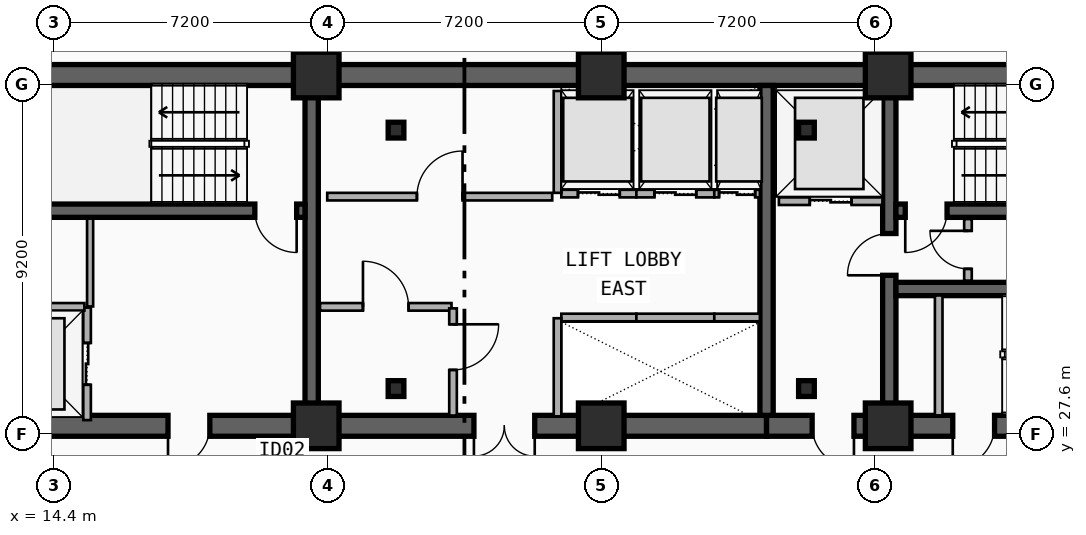
"""IFC4 building model, lengths in metres.
Left out: names, types, materials, properties, quantities, classifications, styles, units other than length and angle.
Written with IfcOpenShell. Run it as: python <this file> out.ifc"""

import sys

from ifc_helpers import new_model, si_unit, direction, frame, frame_2d, origin, origin_2d, place, context, subcontext, project, spatial, rectangle, i_section, extrude, element, fill, save


model = new_model("IFC4")
c1 = context("Model", 3, precision=1e-05, world=origin(), true_north=direction((0.0, 1.0)))
c2 = subcontext(c1, "Body", "Model", "MODEL_VIEW")
j1 = project(units=[si_unit("LENGTHUNIT", "METRE"), si_unit("PLANEANGLEUNIT", "RADIAN")], contexts=[c1])
p1 = place(None, origin())
s1 = spatial("IfcSite", under=j1, at=p1, CompositionType="ELEMENT")
p2 = place(p1, origin())
s2 = spatial("IfcBuilding", under=s1, at=p2, CompositionType="ELEMENT")
p3 = place(p2, frame((0.0, 0.0, 176.75)))
s3 = spatial("IfcBuildingStorey", under=s2, at=p3, CompositionType="ELEMENT", Elevation=176.75)
p4 = place(p3, frame((12.15, 37.05, 0.0), z_axis=(0.0, 0.0, 1.0), x_axis=(1.0, 0.0, 0.0)))
e1 = element("IfcWall", 1, at=p4, inside=s3, PredefinedType="SHEAR", context=c2, shape_type="SweptSolid", body=[
    extrude(rectangle(XDim=33.23, YDim=0.55, at=frame_2d((16.615, 0.0))), origin(), (0.0, 0.0, 1.0), 3.55),
])
p5 = place(p3, frame((21.18, 27.82, 0.0), z_axis=(0.0, 0.0, 1.0), x_axis=(-1.0, 0.0, 0.0)))
e2 = element("IfcWall", 2, at=p5, inside=s3, PredefinedType="SHEAR", context=c2, shape_type="SweptSolid", body=[
    extrude(rectangle(XDim=9.03, YDim=0.55, at=frame_2d((4.515, 0.0))), origin(), (0.0, 0.0, 1.0), 3.55),
])
p6 = place(p5, frame((2.68, 0.0, 0.0)))
e3 = element("IfcOpeningElement", 3, at=p6, cuts=e2, PredefinedType="OPENING", context=c2, shape_type="SweptSolid", body=[
    extrude(rectangle(XDim=1.1, YDim=2.15, at=frame_2d((0.55, 1.075))), frame((0.0, 0.285, 0.0), z_axis=(0.0, -1.0, 0.0), x_axis=(1.0, 0.0, 0.0)), (0.0, 0.0, 1.0), 0.57),
])
p7 = place(p3, frame((33.15, 27.82, 0.0), z_axis=(0.0, 0.0, 1.0), x_axis=(-1.0, 0.0, 0.0)))
e4 = element("IfcWall", 4, at=p7, inside=s3, PredefinedType="SHEAR", context=c2, shape_type="SweptSolid", body=[
    extrude(rectangle(XDim=11.97, YDim=0.55, at=frame_2d((5.985, 0.0))), origin(), (0.0, 0.0, 1.0), 3.55),
])
p8 = place(p7, frame((6.1, 0.0, 0.0)))
e5 = element("IfcOpeningElement", 5, at=p8, cuts=e4, PredefinedType="OPENING", context=c2, shape_type="SweptSolid", body=[
    extrude(rectangle(XDim=1.6, YDim=2.2, at=frame_2d((0.8, 1.1))), frame((0.0, 0.285, 0.0), z_axis=(0.0, -1.0, 0.0), x_axis=(1.0, 0.0, 0.0)), (0.0, 0.0, 1.0), 0.57),
])
p9 = place(p3, frame((45.38, 27.82, 0.0), z_axis=(0.0, 0.0, 1.0), x_axis=(-1.0, 0.0, 0.0)))
e6 = element("IfcWall", 6, at=p9, inside=s3, PredefinedType="SHEAR", context=c2, shape_type="SweptSolid", body=[
    extrude(rectangle(XDim=12.23, YDim=0.55, at=frame_2d((6.115, 0.0))), origin(), (0.0, 0.0, 1.0), 3.55),
])
p10 = place(p9, frame((9.93, 0.0, 0.0)))
e7 = element("IfcOpeningElement", 7, at=p10, cuts=e6, PredefinedType="OPENING", context=c2, shape_type="SweptSolid", body=[
    extrude(rectangle(XDim=1.1, YDim=2.15, at=frame_2d((0.55, 1.075))), frame((0.0, 0.285, 0.0), z_axis=(0.0, -1.0, 0.0), x_axis=(1.0, 0.0, 0.0)), (0.0, 0.0, 1.0), 0.57),
])
p11 = place(p9, frame((6.23, 0.0, 0.0)))
e8 = element("IfcOpeningElement", 8, at=p11, cuts=e6, PredefinedType="OPENING", context=c2, shape_type="SweptSolid", body=[
    extrude(rectangle(XDim=1.1, YDim=2.15, at=frame_2d((0.55, 1.075))), frame((0.0, 0.285, 0.0), z_axis=(0.0, -1.0, 0.0), x_axis=(1.0, 0.0, 0.0)), (0.0, 0.0, 1.0), 0.57),
])
for number, where, z_axis, x_axis in (
    (9, (21.18, 28.095, 0.0), (0.0, 0.0, 1.0), (0.0, 1.0, 0.0)),
    (10, (33.15, 28.095, 0.0), (0.0, 0.0, 1.0), (0.0, 1.0, 0.0)),
):
    element("IfcWall", number, at=place(p3, frame(where, z_axis=z_axis, x_axis=x_axis)), inside=s3, PredefinedType="SHEAR", context=c2, shape_type="SweptSolid", body=[
        extrude(rectangle(XDim=8.68, YDim=0.35, at=frame_2d((4.34, 0.0))), origin(), (0.0, 0.0, 1.0), 3.55),
    ])
p12 = place(p3, frame((36.38, 28.095, 0.0), z_axis=(0.0, 0.0, 1.0), x_axis=(0.0, 1.0, 0.0)))
e11 = element("IfcWall", 11, at=p12, inside=s3, PredefinedType="SHEAR", context=c2, shape_type="SweptSolid", body=[
    extrude(rectangle(XDim=8.68, YDim=0.35, at=frame_2d((4.34, 0.0))), origin(), (0.0, 0.0, 1.0), 3.55),
])
p13 = place(p12, frame((3.685, 0.0, 0.0)))
e12 = element("IfcOpeningElement", 12, at=p13, cuts=e11, PredefinedType="OPENING", context=c2, shape_type="SweptSolid", body=[
    extrude(rectangle(XDim=1.1, YDim=2.15, at=frame_2d((0.55, 1.075))), frame((0.0, 0.185, 0.0), z_axis=(0.0, -1.0, 0.0), x_axis=(1.0, 0.0, 0.0)), (0.0, 0.0, 1.0), 0.37),
])
p14 = place(p3, frame((21.005, 33.48, 0.0), z_axis=(0.0, 0.0, 1.0), x_axis=(-1.0, 0.0, 0.0)))
e13 = element("IfcWall", 13, at=p14, inside=s3, PredefinedType="SHEAR", context=c2, shape_type="SweptSolid", body=[
    extrude(rectangle(XDim=8.58, YDim=0.35, at=frame_2d((4.29, 0.0))), origin(), (0.0, 0.0, 1.0), 3.55),
])
p15 = place(p14, frame((0.22, 0.0, 0.0)))
e14 = element("IfcOpeningElement", 14, at=p15, cuts=e13, PredefinedType="OPENING", context=c2, shape_type="SweptSolid", body=[
    extrude(rectangle(XDim=1.1, YDim=2.15, at=frame_2d((0.55, 1.075))), frame((0.0, 0.185, 0.0), z_axis=(0.0, -1.0, 0.0), x_axis=(1.0, 0.0, 0.0)), (0.0, 0.0, 1.0), 0.37),
])
p16 = place(p3, frame((45.105, 33.48, 0.0), z_axis=(0.0, 0.0, 1.0), x_axis=(-1.0, 0.0, 0.0)))
e15 = element("IfcWall", 15, at=p16, inside=s3, PredefinedType="SHEAR", context=c2, shape_type="SweptSolid", body=[
    extrude(rectangle(XDim=8.55, YDim=0.35, at=frame_2d((4.275, 0.0))), origin(), (0.0, 0.0, 1.0), 3.55),
])
p17 = place(p16, frame((7.205, 0.0, 0.0)))
e16 = element("IfcOpeningElement", 16, at=p17, cuts=e15, PredefinedType="OPENING", context=c2, shape_type="SweptSolid", body=[
    extrude(rectangle(XDim=1.1, YDim=2.15, at=frame_2d((0.55, 1.075))), frame((0.0, 0.185, 0.0), z_axis=(0.0, -1.0, 0.0), x_axis=(1.0, 0.0, 0.0)), (0.0, 0.0, 1.0), 0.37),
])
p18 = place(p3, frame((36.555, 31.42, 0.0), z_axis=(0.0, 0.0, 1.0), x_axis=(1.0, 0.0, 0.0)))
e17 = element("IfcWall", 17, at=p18, inside=s3, PredefinedType="SHEAR", context=c2, shape_type="SweptSolid", body=[
    extrude(rectangle(XDim=8.55, YDim=0.35, at=frame_2d((4.275, 0.0))), origin(), (0.0, 0.0, 1.0), 3.55),
])
for number, where, z_axis, x_axis in (
    (18, (23.4, 28.8, 0.0), (0.0, 0.0, 1.0), (1.0, 0.0, 0.0)),
    (19, (34.2, 28.8, 0.0), (0.0, 0.0, 1.0), (1.0, 0.0, 0.0)),
    (20, (34.2, 35.6, 0.0), (0.0, 0.0, 1.0), (1.0, 0.0, 0.0)),
    (21, (23.4, 35.6, 0.0), (0.0, 0.0, 1.0), (1.0, 0.0, 0.0)),
):
    element("IfcColumn", number, at=place(p3, frame(where, z_axis=z_axis, x_axis=x_axis)), inside=s3, PredefinedType="COLUMN", context=c2, shape_type="SweptSolid", body=[
        extrude(i_section(OverallWidth=0.413, OverallDepth=0.415, WebThickness=0.03, FlangeThickness=0.047, FilletRadius=0.015, at=origin_2d()), origin(), (0.0, 0.0, 1.0), 3.55),
    ])
for number, where, z_axis, x_axis in (
    (22, (21.3, 27.82, 0.0), (0.0, 0.0, 1.0), (1.0, 0.0, 0.0)),
    (23, (21.3, 37.05, 0.0), (0.0, 0.0, 1.0), (1.0, 0.0, 0.0)),
    (24, (28.8, 27.82, 0.0), (0.0, 0.0, 1.0), (1.0, 0.0, 0.0)),
    (25, (28.8, 37.05, 0.0), (0.0, 0.0, 1.0), (1.0, 0.0, 0.0)),
    (26, (36.35, 27.82, 0.0), (0.0, 0.0, 1.0), (1.0, 0.0, 0.0)),
    (27, (36.35, 37.05, 0.0), (0.0, 0.0, 1.0), (1.0, 0.0, 0.0)),
):
    element("IfcColumn", number, at=place(p3, frame(where, z_axis=z_axis, x_axis=x_axis)), inside=s3, PredefinedType="COLUMN", context=c2, shape_type="SweptSolid", body=[
        extrude(rectangle(XDim=1.2, YDim=1.2, at=origin_2d()), origin(), (0.0, 0.0, 1.0), 3.55),
    ])
p19 = place(p3, frame((15.27, 27.97, 0.0), z_axis=(0.0, 0.0, 1.0), x_axis=(0.0, 1.0, 0.0)))
e28 = element("IfcWall", 28, at=p19, inside=s3, PredefinedType="PARTITIONING", context=c2, shape_type="SweptSolid", body=[
    extrude(rectangle(XDim=2.96, YDim=0.2, at=frame_2d((1.48, 0.0))), origin(), (0.0, 0.0, 1.0), 2.36),
])
p20 = place(p19, frame((0.93, 0.0, 0.0)))
e29 = element("IfcOpeningElement", 29, at=p20, cuts=e28, PredefinedType="OPENING", context=c2, shape_type="SweptSolid", body=[
    extrude(rectangle(XDim=1.1, YDim=2.15, at=frame_2d((0.55, 1.075))), frame((0.0, 0.11, 0.0), z_axis=(0.0, -1.0, 0.0), x_axis=(1.0, 0.0, 0.0)), (0.0, 0.0, 1.0), 0.22),
])
p21 = place(p3, frame((12.45, 30.95, 0.0), z_axis=(0.0, 0.0, 1.0), x_axis=(1.0, 0.0, 0.0)))
e30 = element("IfcWall", 30, at=p21, inside=s3, PredefinedType="PARTITIONING", context=c2, shape_type="SweptSolid", body=[
    extrude(rectangle(XDim=2.75, YDim=0.2, at=frame_2d((1.375, 0.0))), origin(), (0.0, 0.0, 1.0), 2.36),
])
p22 = place(p3, frame((33.475, 33.73, 0.0), z_axis=(0.0, 0.0, 1.0), x_axis=(1.0, 0.0, 0.0)))
e31 = element("IfcWall", 31, at=p22, inside=s3, PredefinedType="PARTITIONING", context=c2, shape_type="SweptSolid", body=[
    extrude(rectangle(XDim=2.725, YDim=0.2, at=frame_2d((1.362, 0.0))), origin(), (0.0, 0.0, 1.0), 2.36),
])
p23 = place(p22, frame((0.812, 0.0, 0.0)))
e32 = element("IfcOpeningElement", 32, at=p23, cuts=e31, PredefinedType="OPENING", context=c2, shape_type="SweptSolid", body=[
    extrude(rectangle(XDim=1.1, YDim=2.15, at=frame_2d((0.55, 1.075))), frame((0.0, 0.11, 0.0), z_axis=(0.0, -1.0, 0.0), x_axis=(1.0, 0.0, 0.0)), (0.0, 0.0, 1.0), 0.22),
])
p24 = place(p3, frame((27.75, 30.67, 0.0), z_axis=(0.0, 0.0, 1.0), x_axis=(1.0, 0.0, 0.0)))
e33 = element("IfcWall", 33, at=p24, inside=s3, PredefinedType="PARTITIONING", context=c2, shape_type="SweptSolid", body=[
    extrude(rectangle(XDim=1.975, YDim=0.2, at=frame_2d((0.988, 0.0))), origin(), (0.0, 0.0, 1.0), 2.36),
])
p25 = place(p3, frame((27.65, 28.07, 0.0), z_axis=(0.0, 0.0, 1.0), x_axis=(0.0, 1.0, 0.0)))
e34 = element("IfcWall", 34, at=p25, inside=s3, PredefinedType="PARTITIONING", context=c2, shape_type="SweptSolid", body=[
    extrude(rectangle(XDim=2.58, YDim=0.2, at=frame_2d((1.29, 0.0))), origin(), (0.0, 0.0, 1.0), 2.36),
])
p26 = place(p3, frame((29.725, 30.67, 0.0), z_axis=(0.0, 0.0, 1.0), x_axis=(1.0, 0.0, 0.0)))
e35 = element("IfcWall", 35, at=p26, inside=s3, PredefinedType="PARTITIONING", context=c2, shape_type="SweptSolid", body=[
    extrude(rectangle(XDim=2.05, YDim=0.2, at=frame_2d((1.025, 0.0))), origin(), (0.0, 0.0, 1.0), 2.67),
])
p27 = place(p3, frame((31.775, 30.67, 0.0), z_axis=(0.0, 0.0, 1.0), x_axis=(1.0, 0.0, 0.0)))
e36 = element("IfcWall", 36, at=p27, inside=s3, PredefinedType="PARTITIONING", context=c2, shape_type="SweptSolid", body=[
    extrude(rectangle(XDim=1.2, YDim=0.2, at=frame_2d((0.6, 0.0))), origin(), (0.0, 0.0, 1.0), 2.67),
])
p28 = place(p3, frame((27.75, 33.93, 0.0), z_axis=(0.0, 0.0, 1.0), x_axis=(1.0, 0.0, 0.0)))
e37 = element("IfcWall", 37, at=p28, inside=s3, PredefinedType="PARTITIONING", context=c2, shape_type="SweptSolid", body=[
    extrude(rectangle(XDim=1.975, YDim=0.2, at=frame_2d((0.988, 0.0))), origin(), (0.0, 0.0, 1.0), 2.36),
])
p29 = place(p28, frame((0.438, 0.0, 0.0)))
e38 = element("IfcOpeningElement", 38, at=p29, cuts=e37, PredefinedType="OPENING", context=c2, shape_type="SweptSolid", body=[
    extrude(rectangle(XDim=1.1, YDim=2.15, at=frame_2d((0.55, 1.075))), frame((0.0, 0.11, 0.0), z_axis=(0.0, -1.0, 0.0), x_axis=(1.0, 0.0, 0.0)), (0.0, 0.0, 1.0), 0.22),
])
p30 = place(p3, frame((27.65, 33.95, 0.0), z_axis=(0.0, 0.0, 1.0), x_axis=(0.0, 1.0, 0.0)))
e39 = element("IfcWall", 39, at=p30, inside=s3, PredefinedType="PARTITIONING", context=c2, shape_type="SweptSolid", body=[
    extrude(rectangle(XDim=2.68, YDim=0.2, at=frame_2d((1.34, 0.0))), origin(), (0.0, 0.0, 1.0), 2.36),
])
p31 = place(p3, frame((29.725, 33.93, 0.0), z_axis=(0.0, 0.0, 1.0), x_axis=(1.0, 0.0, 0.0)))
e40 = element("IfcWall", 40, at=p31, inside=s3, PredefinedType="PARTITIONING", context=c2, shape_type="SweptSolid", body=[
    extrude(rectangle(XDim=2.05, YDim=0.2, at=frame_2d((1.025, 0.0))), origin(), (0.0, 0.0, 1.0), 3.29),
])
p32 = place(p31, frame((0.475, 0.0, 0.0)))
e41 = element("IfcOpeningElement", 41, at=p32, cuts=e40, PredefinedType="OPENING", context=c2, shape_type="SweptSolid", body=[
    extrude(rectangle(XDim=1.1, YDim=2.15, at=frame_2d((0.55, 1.075))), frame((0.0, 0.11, 0.0), z_axis=(0.0, -1.0, 0.0), x_axis=(1.0, 0.0, 0.0)), (0.0, 0.0, 1.0), 0.22),
])
p33 = place(p3, frame((31.775, 33.93, 0.0), z_axis=(0.0, 0.0, 1.0), x_axis=(1.0, 0.0, 0.0)))
e42 = element("IfcWall", 42, at=p33, inside=s3, PredefinedType="PARTITIONING", context=c2, shape_type="SweptSolid", body=[
    extrude(rectangle(XDim=1.2, YDim=0.2, at=frame_2d((0.6, 0.0))), origin(), (0.0, 0.0, 1.0), 3.29),
])
p34 = place(p33, frame((0.125, 0.0, 0.0)))
e43 = element("IfcOpeningElement", 43, at=p34, cuts=e42, PredefinedType="OPENING", context=c2, shape_type="SweptSolid", body=[
    extrude(rectangle(XDim=0.95, YDim=2.15, at=frame_2d((0.475, 1.075))), frame((0.0, 0.11, 0.0), z_axis=(0.0, -1.0, 0.0), x_axis=(1.0, 0.0, 0.0)), (0.0, 0.0, 1.0), 0.22),
])
p35 = place(p3, frame((37.68, 28.095, 0.0), z_axis=(0.0, 0.0, 1.0), x_axis=(0.0, 1.0, 0.0)))
e44 = element("IfcWall", 44, at=p35, inside=s3, PredefinedType="PARTITIONING", context=c2, shape_type="SweptSolid", body=[
    extrude(rectangle(XDim=3.155, YDim=0.2, at=frame_2d((1.578, 0.0))), origin(), (0.0, 0.0, 1.0), 2.67),
])
p36 = place(p3, frame((38.45, 31.64, 0.0), z_axis=(0.0, 0.0, 1.0), x_axis=(0.0, 1.0, 0.0)))
e45 = element("IfcWall", 45, at=p36, inside=s3, PredefinedType="PARTITIONING", context=c2, shape_type="SweptSolid", body=[
    extrude(rectangle(XDim=1.62, YDim=0.2, at=frame_2d((0.81, 0.0))), origin(), (0.0, 0.0, 1.0), 3.29),
])
p37 = place(p36, frame((0.31, 0.0, 0.0)))
e46 = element("IfcOpeningElement", 46, at=p37, cuts=e45, PredefinedType="OPENING", context=c2, shape_type="SweptSolid", body=[
    extrude(rectangle(XDim=1.0, YDim=2.15, at=frame_2d((0.5, 1.075))), frame((0.0, 0.11, 0.0), z_axis=(0.0, -1.0, 0.0), x_axis=(1.0, 0.0, 0.0)), (0.0, 0.0, 1.0), 0.22),
])
p38 = place(p3, frame((21.4, 30.95, 0.0), z_axis=(0.0, 0.0, 1.0), x_axis=(1.0, 0.0, 0.0)))
e47 = element("IfcWall", 47, at=p38, inside=s3, PredefinedType="PARTITIONING", context=c2, shape_type="SweptSolid", body=[
    extrude(rectangle(XDim=3.46, YDim=0.2, at=frame_2d((1.73, 0.0))), origin(), (0.0, 0.0, 1.0), 2.36),
])
p39 = place(p38, frame((1.13, 0.0, 0.0)))
e48 = element("IfcOpeningElement", 48, at=p39, cuts=e47, PredefinedType="OPENING", context=c2, shape_type="SweptSolid", body=[
    extrude(rectangle(XDim=1.2, YDim=2.15, at=frame_2d((0.6, 1.075))), frame((0.0, 0.11, 0.0), z_axis=(0.0, -1.0, 0.0), x_axis=(1.0, 0.0, 0.0)), (0.0, 0.0, 1.0), 0.22),
])
p40 = place(p3, frame((21.59, 33.85, 0.0), z_axis=(0.0, 0.0, 1.0), x_axis=(1.0, 0.0, 0.0)))
e49 = element("IfcWall", 49, at=p40, inside=s3, PredefinedType="PARTITIONING", context=c2, shape_type="SweptSolid", body=[
    extrude(rectangle(XDim=5.92, YDim=0.2, at=frame_2d((2.96, 0.0))), origin(), (0.0, 0.0, 1.0), 2.36),
])
p41 = place(p40, frame((2.36, 0.0, 0.0)))
e50 = element("IfcOpeningElement", 50, at=p41, cuts=e49, PredefinedType="OPENING", context=c2, shape_type="SweptSolid", body=[
    extrude(rectangle(XDim=1.2, YDim=2.15, at=frame_2d((0.6, 1.075))), frame((0.0, 0.11, 0.0), z_axis=(0.0, -1.0, 0.0), x_axis=(1.0, 0.0, 0.0)), (0.0, 0.0, 1.0), 0.22),
])
p42 = place(p3, frame((24.9, 30.91, 0.0), z_axis=(0.0, 0.0, 1.0), x_axis=(0.0, -1.0, 0.0)))
e51 = element("IfcWall", 51, at=p42, inside=s3, PredefinedType="PARTITIONING", context=c2, shape_type="SweptSolid", body=[
    extrude(rectangle(XDim=2.82, YDim=0.2, at=frame_2d((1.41, 0.0))), origin(), (0.0, 0.0, 1.0), 2.67),
])
p43 = place(p42, frame((0.419, 0.0, 0.0)))
e52 = element("IfcOpeningElement", 52, at=p43, cuts=e51, PredefinedType="OPENING", context=c2, shape_type="SweptSolid", body=[
    extrude(rectangle(XDim=1.2, YDim=2.15, at=frame_2d((0.6, 1.075))), frame((0.0, 0.11, 0.0), z_axis=(0.0, -1.0, 0.0), x_axis=(1.0, 0.0, 0.0)), (0.0, 0.0, 1.0), 0.22),
])
p44 = place(p3, frame((15.35, 30.96, 0.0), z_axis=(0.0, 0.0, 1.0), x_axis=(0.0, 1.0, 0.0)))
e53 = element("IfcWall", 53, at=p44, inside=s3, PredefinedType="PARTITIONING", context=c2, shape_type="SweptSolid", body=[
    extrude(rectangle(XDim=2.31, YDim=0.16, at=frame_2d((1.155, 0.0))), origin(), (0.0, 0.0, 1.0), 3.29),
])
p45 = place(p20, origin())
e54 = element("IfcDoor", 54, at=p45, inside=s3, OperationType="DOUBLE_DOOR_SLIDING", PredefinedType="DOOR", context=c2, shape_type="SweptSolid", body=[
    extrude(rectangle(XDim=1.1, YDim=2.15, at=frame_2d((0.55, 1.075))), frame((0.0, 0.025, 0.0), z_axis=(0.0, -1.0, 0.0), x_axis=(1.0, 0.0, 0.0)), (0.0, 0.0, 1.0), 0.05),
])
fill(e29, e54)
p46 = place(p23, origin())
e55 = element("IfcDoor", 55, at=p46, inside=s3, OperationType="DOUBLE_DOOR_SLIDING", PredefinedType="DOOR", context=c2, shape_type="SweptSolid", body=[
    extrude(rectangle(XDim=1.1, YDim=2.15, at=frame_2d((0.55, 1.075))), frame((0.0, 0.025, 0.0), z_axis=(0.0, -1.0, 0.0), x_axis=(1.0, 0.0, 0.0)), (0.0, 0.0, 1.0), 0.05),
])
fill(e32, e55)
p47 = place(p29, origin())
e56 = element("IfcDoor", 56, at=p47, inside=s3, OperationType="DOUBLE_DOOR_SLIDING", PredefinedType="DOOR", context=c2, shape_type="SweptSolid", body=[
    extrude(rectangle(XDim=1.1, YDim=2.15, at=frame_2d((0.55, 1.075))), frame((0.0, 0.025, 0.0), z_axis=(0.0, -1.0, 0.0), x_axis=(1.0, 0.0, 0.0)), (0.0, 0.0, 1.0), 0.05),
])
fill(e38, e56)
p48 = place(p32, origin())
e57 = element("IfcDoor", 57, at=p48, inside=s3, OperationType="DOUBLE_DOOR_SLIDING", PredefinedType="DOOR", context=c2, shape_type="SweptSolid", body=[
    extrude(rectangle(XDim=1.1, YDim=2.15, at=frame_2d((0.55, 1.075))), frame((0.0, 0.025, 0.0), z_axis=(0.0, -1.0, 0.0), x_axis=(1.0, 0.0, 0.0)), (0.0, 0.0, 1.0), 0.05),
])
fill(e41, e57)
p49 = place(p34, origin())
e58 = element("IfcDoor", 58, at=p49, inside=s3, OperationType="DOUBLE_DOOR_SLIDING", PredefinedType="DOOR", context=c2, shape_type="SweptSolid", body=[
    extrude(rectangle(XDim=0.95, YDim=2.15, at=frame_2d((0.475, 1.075))), frame((0.0, 0.025, 0.0), z_axis=(0.0, -1.0, 0.0), x_axis=(1.0, 0.0, 0.0)), (0.0, 0.0, 1.0), 0.05),
])
fill(e43, e58)
p50 = place(p15, origin())
e59 = element("IfcDoor", 59, at=p50, inside=s3, OperationType="SINGLE_SWING_LEFT", PredefinedType="DOOR", context=c2, shape_type="SweptSolid", body=[
    extrude(rectangle(XDim=1.1, YDim=2.15, at=frame_2d((0.55, 1.075))), frame((0.0, 0.025, 0.0), z_axis=(0.0, -1.0, 0.0), x_axis=(1.0, 0.0, 0.0)), (0.0, 0.0, 1.0), 0.05),
])
fill(e14, e59)
p51 = place(p6, origin())
e60 = element("IfcDoor", 60, at=p51, inside=s3, OperationType="SINGLE_SWING_RIGHT", PredefinedType="DOOR", context=c2, shape_type="SweptSolid", body=[
    extrude(rectangle(XDim=1.1, YDim=2.15, at=frame_2d((0.55, 1.075))), frame((0.0, 0.025, 0.0), z_axis=(0.0, -1.0, 0.0), x_axis=(1.0, 0.0, 0.0)), (0.0, 0.0, 1.0), 0.05),
])
fill(e3, e60)
p52 = place(p17, origin())
e61 = element("IfcDoor", 61, at=p52, inside=s3, OperationType="SINGLE_SWING_RIGHT", PredefinedType="DOOR", context=c2, shape_type="SweptSolid", body=[
    extrude(rectangle(XDim=1.1, YDim=2.15, at=frame_2d((0.55, 1.075))), frame((0.0, 0.025, 0.0), z_axis=(0.0, -1.0, 0.0), x_axis=(1.0, 0.0, 0.0)), (0.0, 0.0, 1.0), 0.05),
])
fill(e16, e61)
p53 = place(p13, origin())
e62 = element("IfcDoor", 62, at=p53, inside=s3, OperationType="SINGLE_SWING_LEFT", PredefinedType="DOOR", context=c2, shape_type="SweptSolid", body=[
    extrude(rectangle(XDim=1.1, YDim=2.15, at=frame_2d((0.55, 1.075))), frame((0.0, 0.025, 0.0), z_axis=(0.0, -1.0, 0.0), x_axis=(1.0, 0.0, 0.0)), (0.0, 0.0, 1.0), 0.05),
])
fill(e12, e62)
p54 = place(p10, origin())
e63 = element("IfcDoor", 63, at=p54, inside=s3, OperationType="SINGLE_SWING_LEFT", PredefinedType="DOOR", context=c2, shape_type="SweptSolid", body=[
    extrude(rectangle(XDim=1.1, YDim=2.15, at=frame_2d((0.55, 1.075))), frame((0.0, 0.025, 0.0), z_axis=(0.0, -1.0, 0.0), x_axis=(1.0, 0.0, 0.0)), (0.0, 0.0, 1.0), 0.05),
])
fill(e7, e63)
p55 = place(p11, origin())
e64 = element("IfcDoor", 64, at=p55, inside=s3, OperationType="SINGLE_SWING_RIGHT", PredefinedType="DOOR", context=c2, shape_type="SweptSolid", body=[
    extrude(rectangle(XDim=1.1, YDim=2.15, at=frame_2d((0.55, 1.075))), frame((0.0, 0.025, 0.0), z_axis=(0.0, -1.0, 0.0), x_axis=(1.0, 0.0, 0.0)), (0.0, 0.0, 1.0), 0.05),
])
fill(e8, e64)
p56 = place(p8, origin())
e65 = element("IfcDoor", 65, at=p56, inside=s3, OperationType="SINGLE_SWING_LEFT", PredefinedType="DOOR", context=c2, shape_type="SweptSolid", body=[
    extrude(rectangle(XDim=1.6, YDim=2.2, at=frame_2d((0.8, 1.1))), frame((0.0, 0.025, 0.0), z_axis=(0.0, -1.0, 0.0), x_axis=(1.0, 0.0, 0.0)), (0.0, 0.0, 1.0), 0.05),
])
fill(e5, e65)
p57 = place(p37, origin())
e66 = element("IfcDoor", 66, at=p57, inside=s3, OperationType="SINGLE_SWING_RIGHT", PredefinedType="DOOR", context=c2, shape_type="SweptSolid", body=[
    extrude(rectangle(XDim=1.0, YDim=2.15, at=frame_2d((0.5, 1.075))), frame((0.0, 0.025, 0.0), z_axis=(0.0, -1.0, 0.0), x_axis=(1.0, 0.0, 0.0)), (0.0, 0.0, 1.0), 0.05),
])
fill(e46, e66)
p58 = place(p39, origin())
e67 = element("IfcDoor", 67, at=p58, inside=s3, OperationType="SINGLE_SWING_LEFT", PredefinedType="DOOR", context=c2, shape_type="SweptSolid", body=[
    extrude(rectangle(XDim=1.2, YDim=2.15, at=frame_2d((0.6, 1.075))), frame((0.0, 0.025, 0.0), z_axis=(0.0, -1.0, 0.0), x_axis=(1.0, 0.0, 0.0)), (0.0, 0.0, 1.0), 0.05),
])
fill(e48, e67)
p59 = place(p41, origin())
e68 = element("IfcDoor", 68, at=p59, inside=s3, OperationType="SINGLE_SWING_RIGHT", PredefinedType="DOOR", context=c2, shape_type="SweptSolid", body=[
    extrude(rectangle(XDim=1.2, YDim=2.15, at=frame_2d((0.6, 1.075))), frame((0.0, 0.025, 0.0), z_axis=(0.0, -1.0, 0.0), x_axis=(1.0, 0.0, 0.0)), (0.0, 0.0, 1.0), 0.05),
])
fill(e50, e68)
p60 = place(p43, origin())
e69 = element("IfcDoor", 69, at=p60, inside=s3, OperationType="SINGLE_SWING_LEFT", PredefinedType="DOOR", context=c2, shape_type="SweptSolid", body=[
    extrude(rectangle(XDim=1.2, YDim=2.15, at=frame_2d((0.6, 1.075))), frame((0.0, 0.025, 0.0), z_axis=(0.0, -1.0, 0.0), x_axis=(1.0, 0.0, 0.0)), (0.0, 0.0, 1.0), 0.05),
])
fill(e52, e69)
save(model, sys.argv[1])
